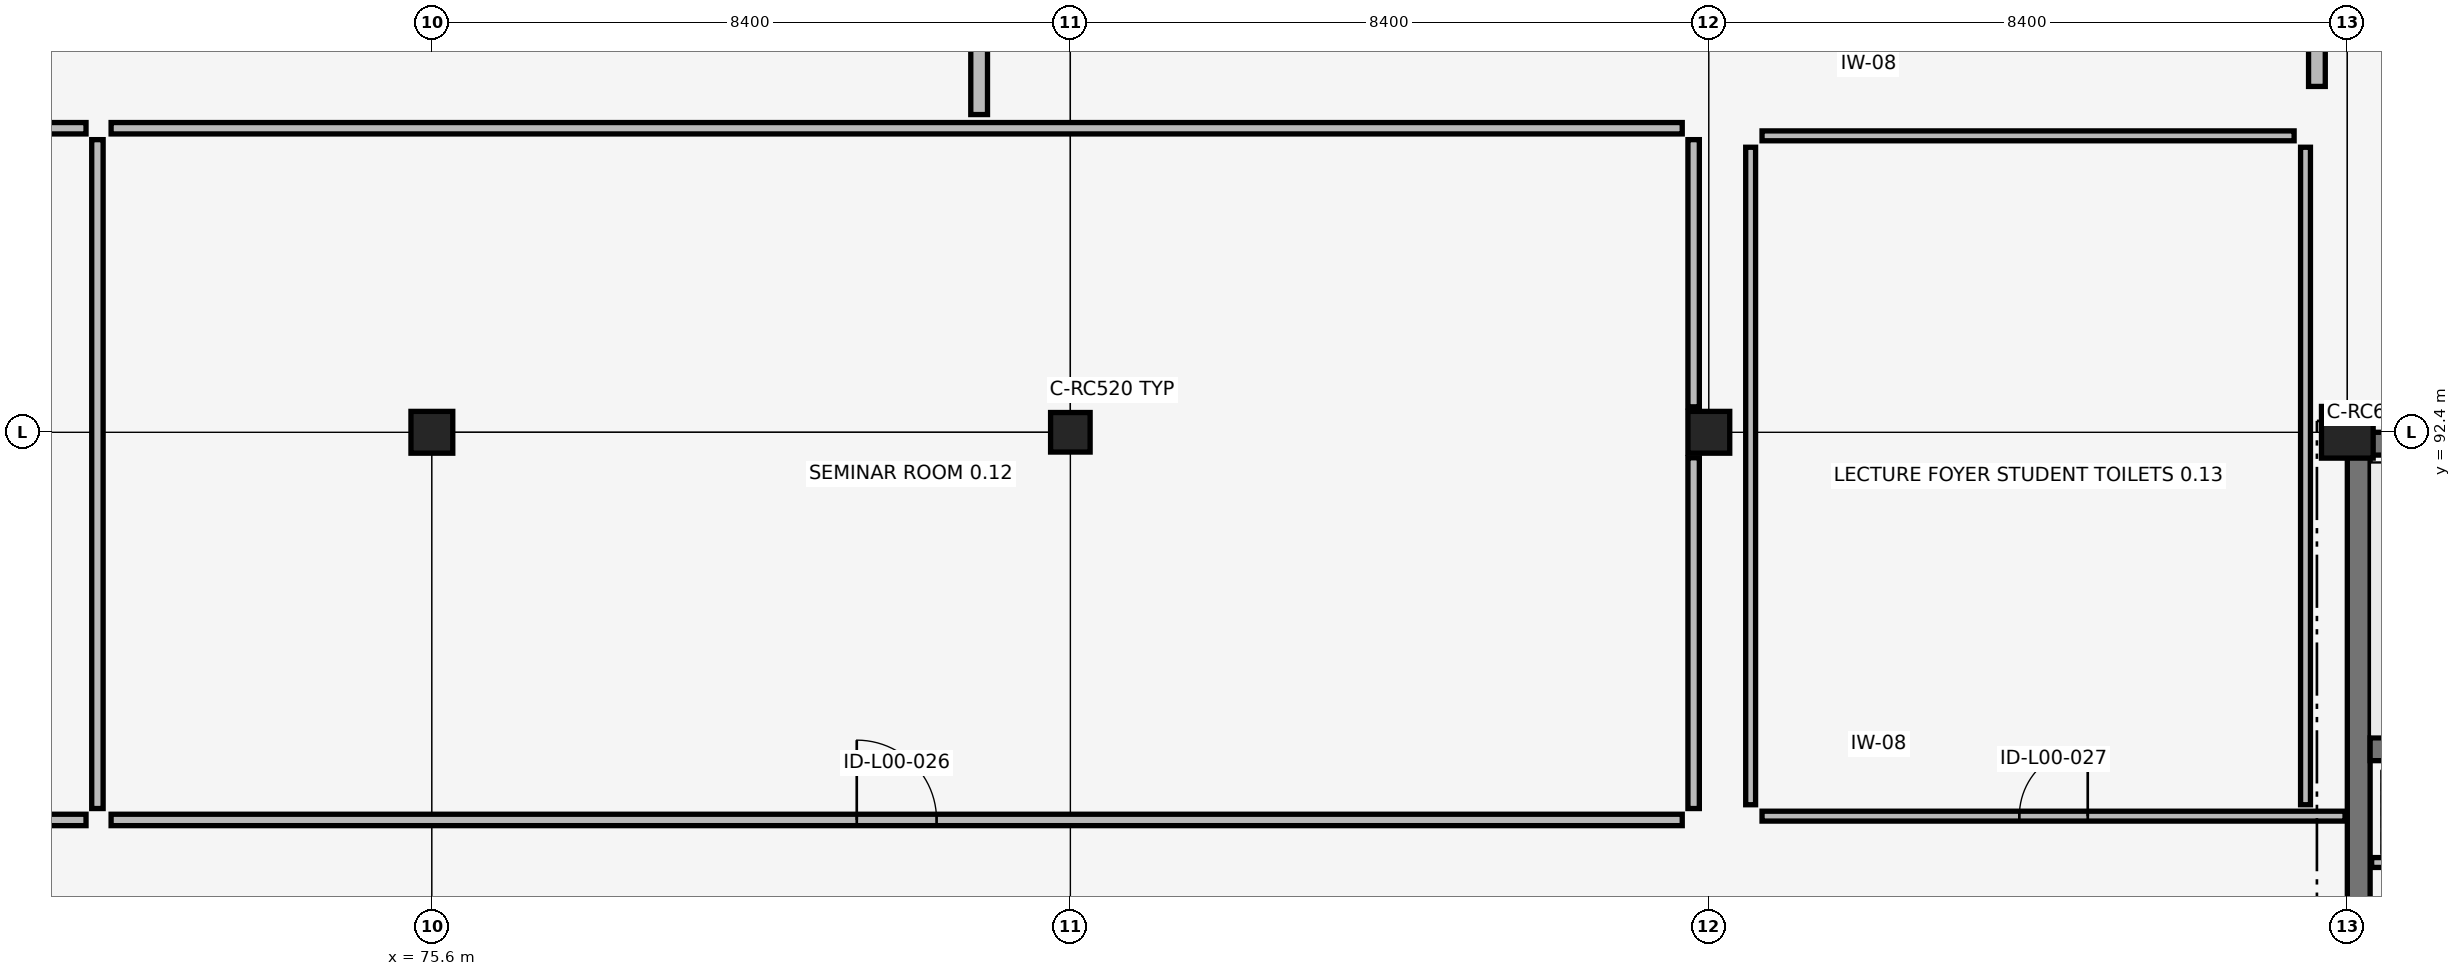
"""IFC4 building model, lengths in metres.
Left out: names, types, materials, properties, quantities, classifications, styles, units other than length and angle.
Written with IfcOpenShell. Run it as: python <this file> out.ifc"""

import sys

from ifc_helpers import new_model, si_unit, direction, frame, frame_2d, origin, origin_2d, place, context, subcontext, project, spatial, rectangle, extrude, element, fill, save


model = new_model("IFC4")
c1 = context("Model", 3, precision=1e-05, world=origin(), true_north=direction((0.0, 1.0)))
c2 = subcontext(c1, "Body", "Model", "MODEL_VIEW")
j1 = project(units=[si_unit("LENGTHUNIT", "METRE"), si_unit("PLANEANGLEUNIT", "RADIAN")], contexts=[c1])
p1 = place(None, origin())
s1 = spatial("IfcSite", under=j1, at=p1, CompositionType="ELEMENT")
p2 = place(p1, origin())
s2 = spatial("IfcBuilding", under=s1, at=p2, CompositionType="ELEMENT")
p3 = place(p2, origin())
s3 = spatial("IfcBuildingStorey", under=s2, at=p3, CompositionType="ELEMENT", Elevation=0.0)
p4 = place(p3, frame((100.95, 92.25, 0.0), z_axis=(0.0, 0.0, 1.0), x_axis=(1.0, 0.0, 0.0)))
e1 = element("IfcWall", 1, at=p4, inside=s3, PredefinedType="SHEAR", context=c2, shape_type="SweptSolid", body=[
    extrude(rectangle(XDim=8.1, YDim=0.3, at=frame_2d((4.05, 0.0))), origin(), (0.0, 0.0, 1.0), 5.14),
])
p5 = place(p3, frame((100.95, 84.15, 0.0), z_axis=(0.0, 0.0, 1.0), x_axis=(0.0, 1.0, 0.0)))
e2 = element("IfcWall", 2, at=p5, inside=s3, PredefinedType="SHEAR", context=c2, shape_type="SweptSolid", body=[
    extrude(rectangle(XDim=8.1, YDim=0.3, at=frame_2d((4.05, 0.0))), origin(), (0.0, 0.0, 1.0), 5.14),
])
p6 = place(p5, frame((1.05, 0.0, 0.0)))
e3 = element("IfcOpeningElement", 3, at=p6, cuts=e2, PredefinedType="OPENING", context=c2, shape_type="SweptSolid", body=[
    extrude(rectangle(XDim=1.0, YDim=2.15, at=frame_2d((0.5, 1.075))), frame((0.0, 0.16, 0.0), z_axis=(0.0, -1.0, 0.0), x_axis=(1.0, 0.0, 0.0)), (0.0, 0.0, 1.0), 0.32),
])
p7 = place(p3, frame((101.1, 88.23, 0.0), z_axis=(0.0, 0.0, 1.0), x_axis=(1.0, 0.0, 0.0)))
e4 = element("IfcWall", 4, at=p7, inside=s3, PredefinedType="SHEAR", context=c2, shape_type="SweptSolid", body=[
    extrude(rectangle(XDim=7.8, YDim=0.3, at=frame_2d((3.9, 0.0))), origin(), (0.0, 0.0, 1.0), 5.14),
])
p8 = place(p7, frame((6.2, 0.0, 0.0)))
e5 = element("IfcOpeningElement", 5, at=p8, cuts=e4, PredefinedType="OPENING", context=c2, shape_type="SweptSolid", body=[
    extrude(rectangle(XDim=1.35, YDim=2.15, at=frame_2d((0.675, 1.075))), frame((0.0, 0.16, 0.0), z_axis=(0.0, -1.0, 0.0), x_axis=(1.0, 0.0, 0.0)), (0.0, 0.0, 1.0), 0.32),
])
p9 = place(p3, frame((75.6, 92.4, -0.32), z_axis=(0.0, 0.0, 1.0), x_axis=(1.0, 0.0, 0.0)))
e6 = element("IfcColumn", 6, at=p9, inside=s3, PredefinedType="COLUMN", context=c2, shape_type="SweptSolid", body=[
    extrude(rectangle(XDim=0.55, YDim=0.55, at=origin_2d()), origin(), (0.0, 0.0, 1.0), 5.46),
])
p10 = place(p3, frame((84.0, 92.4, -0.32), z_axis=(0.0, 0.0, 1.0), x_axis=(1.0, 0.0, 0.0)))
e7 = element("IfcColumn", 7, at=p10, inside=s3, PredefinedType="COLUMN", context=c2, shape_type="SweptSolid", body=[
    extrude(rectangle(XDim=0.52, YDim=0.52, at=origin_2d()), origin(), (0.0, 0.0, 1.0), 5.46),
])
p11 = place(p3, frame((92.4, 92.4, -0.32), z_axis=(0.0, 0.0, 1.0), x_axis=(1.0, 0.0, 0.0)))
e8 = element("IfcColumn", 8, at=p11, inside=s3, PredefinedType="COLUMN", context=c2, shape_type="SweptSolid", body=[
    extrude(rectangle(XDim=0.55, YDim=0.55, at=origin_2d()), origin(), (0.0, 0.0, 1.0), 5.46),
])
p12 = place(p3, frame((100.8, 92.4, 0.0), z_axis=(0.0, 0.0, 1.0), x_axis=(1.0, 0.0, 0.0)))
e9 = element("IfcColumn", 9, at=p12, inside=s3, PredefinedType="COLUMN", context=c2, shape_type="SweptSolid", body=[
    extrude(rectangle(XDim=0.68, YDim=0.68, at=origin_2d()), origin(), (0.0, 0.0, 1.0), 5.14),
])
p13 = place(p3, frame((101.12, 86.74, 0.0), z_axis=(0.0, 0.0, 1.0), x_axis=(1.0, 0.0, 0.0)))
e10 = element("IfcWall", 10, at=p13, inside=s3, PredefinedType="PARTITIONING", context=c2, shape_type="SweptSolid", body=[
    extrude(rectangle(XDim=1.62, YDim=0.13, at=frame_2d((0.81, 0.0))), origin(), (0.0, 0.0, 1.0), 5.14),
])
p14 = place(p3, frame((50.43, 87.3, 0.0), z_axis=(0.0, 0.0, 1.0), x_axis=(1.0, 0.0, 0.0)))
e11 = element("IfcWall", 11, at=p14, inside=s3, PredefinedType="PARTITIONING", context=c2, shape_type="SweptSolid", body=[
    extrude(rectangle(XDim=20.62, YDim=0.15, at=frame_2d((10.31, 0.0))), origin(), (0.0, 0.0, 1.0), 4.49),
])
p15 = place(p14, frame((9.785, 0.0, 0.0)))
e12 = element("IfcOpeningElement", 12, at=p15, cuts=e11, PredefinedType="OPENING", context=c2, shape_type="SweptSolid", body=[
    extrude(rectangle(XDim=1.05, YDim=2.15, at=frame_2d((0.525, 1.075))), frame((0.0, 0.085, 0.0), z_axis=(0.0, -1.0, 0.0), x_axis=(1.0, 0.0, 0.0)), (0.0, 0.0, 1.0), 0.17),
])
p16 = place(p3, frame((50.75, 96.4, 0.0), z_axis=(0.0, 0.0, 1.0), x_axis=(1.0, 0.0, 0.0)))
e13 = element("IfcWall", 13, at=p16, inside=s3, PredefinedType="PARTITIONING", context=c2, shape_type="SweptSolid", body=[
    extrude(rectangle(XDim=20.3, YDim=0.15, at=frame_2d((10.15, 0.0))), origin(), (0.0, 0.0, 1.0), 4.74),
])
p17 = place(p3, frame((71.2, 87.45, 0.0), z_axis=(0.0, 0.0, 1.0), x_axis=(0.0, 1.0, 0.0)))
e14 = element("IfcWall", 14, at=p17, inside=s3, PredefinedType="PARTITIONING", context=c2, shape_type="SweptSolid", body=[
    extrude(rectangle(XDim=8.8, YDim=0.15, at=frame_2d((4.4, 0.0))), origin(), (0.0, 0.0, 1.0), 4.46),
])
p18 = place(p3, frame((71.38, 87.3, 0.0), z_axis=(0.0, 0.0, 1.0), x_axis=(1.0, 0.0, 0.0)))
e15 = element("IfcWall", 15, at=p18, inside=s3, PredefinedType="PARTITIONING", context=c2, shape_type="SweptSolid", body=[
    extrude(rectangle(XDim=20.67, YDim=0.15, at=frame_2d((10.335, 0.0))), origin(), (0.0, 0.0, 1.0), 4.49),
])
p19 = place(p18, frame((9.81, 0.0, 0.0)))
e16 = element("IfcOpeningElement", 16, at=p19, cuts=e15, PredefinedType="OPENING", context=c2, shape_type="SweptSolid", body=[
    extrude(rectangle(XDim=1.05, YDim=2.15, at=frame_2d((0.525, 1.075))), frame((0.0, 0.085, 0.0), z_axis=(0.0, -1.0, 0.0), x_axis=(1.0, 0.0, 0.0)), (0.0, 0.0, 1.0), 0.17),
])
p20 = place(p3, frame((71.38, 96.4, 0.0), z_axis=(0.0, 0.0, 1.0), x_axis=(1.0, 0.0, 0.0)))
e17 = element("IfcWall", 17, at=p20, inside=s3, PredefinedType="PARTITIONING", context=c2, shape_type="SweptSolid", body=[
    extrude(rectangle(XDim=20.67, YDim=0.15, at=frame_2d((10.335, 0.0))), origin(), (0.0, 0.0, 1.0), 4.74),
])
p21 = place(p3, frame((92.2, 87.45, 0.0), z_axis=(0.0, 0.0, 1.0), x_axis=(0.0, 1.0, 0.0)))
e18 = element("IfcWall", 18, at=p21, inside=s3, PredefinedType="PARTITIONING", context=c2, shape_type="SweptSolid", body=[
    extrude(rectangle(XDim=4.615, YDim=0.15, at=frame_2d((2.308, 0.0))), origin(), (0.0, 0.0, 1.0), 4.59),
])
p22 = place(p3, frame((92.2, 92.735, 0.0), z_axis=(0.0, 0.0, 1.0), x_axis=(0.0, 1.0, 0.0)))
e19 = element("IfcWall", 19, at=p22, inside=s3, PredefinedType="PARTITIONING", context=c2, shape_type="SweptSolid", body=[
    extrude(rectangle(XDim=3.515, YDim=0.15, at=frame_2d((1.757, 0.0))), origin(), (0.0, 0.0, 1.0), 5.14),
])
p23 = place(p3, frame((93.1, 87.35, 0.0), z_axis=(0.0, 0.0, 1.0), x_axis=(1.0, 0.0, 0.0)))
e20 = element("IfcWall", 20, at=p23, inside=s3, PredefinedType="PARTITIONING", context=c2, shape_type="SweptSolid", body=[
    extrude(rectangle(XDim=7.67, YDim=0.13, at=frame_2d((3.835, 0.0))), origin(), (0.0, 0.0, 1.0), 4.49),
])
p24 = place(p23, frame((3.385, 0.0, 0.0)))
e21 = element("IfcOpeningElement", 21, at=p24, cuts=e20, PredefinedType="OPENING", context=c2, shape_type="SweptSolid", body=[
    extrude(rectangle(XDim=0.9, YDim=2.1, at=frame_2d((0.45, 1.05))), frame((0.0, 0.075, 0.0), z_axis=(0.0, -1.0, 0.0), x_axis=(1.0, 0.0, 0.0)), (0.0, 0.0, 1.0), 0.15),
])
p25 = place(p3, frame((93.1, 96.3, 0.0), z_axis=(0.0, 0.0, 1.0), x_axis=(1.0, 0.0, 0.0)))
e22 = element("IfcWall", 22, at=p25, inside=s3, PredefinedType="PARTITIONING", context=c2, shape_type="SweptSolid", body=[
    extrude(rectangle(XDim=7.0, YDim=0.13, at=frame_2d((3.5, 0.0))), origin(), (0.0, 0.0, 1.0), 5.14),
])
for number, where, z_axis, x_axis in (
    (23, (92.95, 87.5, 0.0), (0.0, 0.0, 1.0), (0.0, 1.0, 0.0)),
    (24, (100.25, 87.5, 0.0), (0.0, 0.0, 1.0), (0.0, 1.0, 0.0)),
):
    element("IfcWall", number, at=place(p3, frame(where, z_axis=z_axis, x_axis=x_axis)), inside=s3, PredefinedType="PARTITIONING", context=c2, shape_type="SweptSolid", body=[
        extrude(rectangle(XDim=8.65, YDim=0.13, at=frame_2d((4.325, 0.0))), origin(), (0.0, 0.0, 1.0), 4.46),
    ])
p26 = place(p3, frame((82.8, 96.58, 0.0), z_axis=(0.0, 0.0, 1.0), x_axis=(0.0, 1.0, 0.0)))
e25 = element("IfcWall", 25, at=p26, inside=s3, PredefinedType="PARTITIONING", context=c2, shape_type="SweptSolid", body=[
    extrude(rectangle(XDim=20.84, YDim=0.22, at=frame_2d((10.42, 0.0))), origin(), (0.0, 0.0, 1.0), 3.74),
])
p27 = place(p26, frame((9.57, 0.0, 0.0)))
e26 = element("IfcOpeningElement", 26, at=p27, cuts=e25, PredefinedType="OPENING", context=c2, shape_type="SweptSolid", body=[
    extrude(rectangle(XDim=1.7, YDim=2.25, at=frame_2d((0.85, 1.125))), frame((0.0, 0.12, 0.0), z_axis=(0.0, -1.0, 0.0), x_axis=(1.0, 0.0, 0.0)), (0.0, 0.0, 1.0), 0.24),
])
p28 = place(p3, frame((100.4, 96.95, 0.0), z_axis=(0.0, 0.0, 1.0), x_axis=(0.0, 1.0, 0.0)))
e27 = element("IfcWall", 27, at=p28, inside=s3, PredefinedType="PARTITIONING", context=c2, shape_type="SweptSolid", body=[
    extrude(rectangle(XDim=3.44, YDim=0.22, at=frame_2d((1.72, 0.0))), origin(), (0.0, 0.0, 1.0), 5.14),
])
p29 = place(p28, frame((0.87, 0.0, 0.0)))
e28 = element("IfcOpeningElement", 28, at=p29, cuts=e27, PredefinedType="OPENING", context=c2, shape_type="SweptSolid", body=[
    extrude(rectangle(XDim=1.7, YDim=2.25, at=frame_2d((0.85, 1.125))), frame((0.0, 0.12, 0.0), z_axis=(0.0, -1.0, 0.0), x_axis=(1.0, 0.0, 0.0)), (0.0, 0.0, 1.0), 0.24),
])
p30 = place(p19, origin())
e29 = element("IfcDoor", 29, at=p30, inside=s3, OperationType="SINGLE_SWING_LEFT", PredefinedType="DOOR", context=c2, shape_type="SweptSolid", body=[
    extrude(rectangle(XDim=1.05, YDim=2.15, at=frame_2d((0.525, 1.075))), frame((0.0, 0.025, 0.0), z_axis=(0.0, -1.0, 0.0), x_axis=(1.0, 0.0, 0.0)), (0.0, 0.0, 1.0), 0.05),
])
fill(e16, e29)
p31 = place(p24, origin())
e30 = element("IfcDoor", 30, at=p31, inside=s3, OperationType="SINGLE_SWING_RIGHT", PredefinedType="DOOR", context=c2, shape_type="SweptSolid", body=[
    extrude(rectangle(XDim=0.9, YDim=2.1, at=frame_2d((0.45, 1.05))), frame((0.0, 0.025, 0.0), z_axis=(0.0, -1.0, 0.0), x_axis=(1.0, 0.0, 0.0)), (0.0, 0.0, 1.0), 0.05),
])
fill(e21, e30)
save(model, sys.argv[1])
